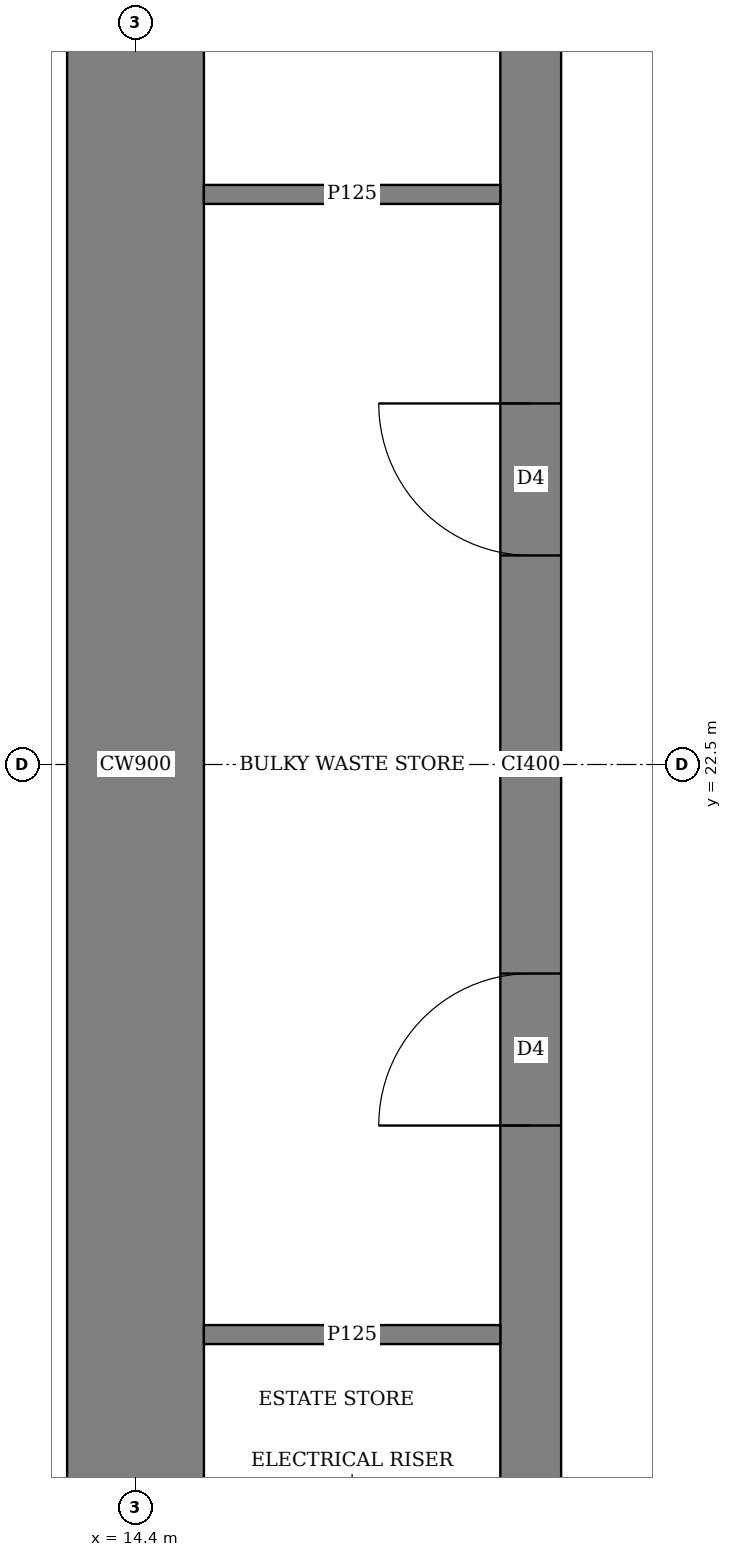
"""IFC4 building model, lengths in metres.
Left out: names, types, materials, properties, quantities, classifications, styles, units other than length and angle.
Written with IfcOpenShell. Run it as: python <this file> out.ifc"""

import sys

from ifc_helpers import new_model, si_unit, direction, frame, frame_2d, origin, place, context, subcontext, project, spatial, rectangle, extrude, element, fill, save


model = new_model("IFC4")
c1 = context("Model", 3, precision=1e-05, world=origin(), true_north=direction((0.0, 1.0)))
c2 = subcontext(c1, "Body", "Model", "MODEL_VIEW")
j1 = project(units=[si_unit("LENGTHUNIT", "METRE"), si_unit("PLANEANGLEUNIT", "RADIAN")], contexts=[c1])
p1 = place(None, origin())
s1 = spatial("IfcSite", under=j1, at=p1, CompositionType="ELEMENT")
p2 = place(p1, origin())
s2 = spatial("IfcBuilding", under=s1, at=p2, CompositionType="ELEMENT")
p3 = place(p2, frame((0.0, 0.0, 227.45)))
s3 = spatial("IfcBuildingStorey", under=s2, at=p3, CompositionType="ELEMENT", Elevation=227.45)
p4 = place(p3, frame((14.4, 15.45, 0.0), z_axis=(0.0, 0.0, 1.0), x_axis=(0.0, 1.0, 0.0)))
e1 = element("IfcWall", 1, at=p4, inside=s3, PredefinedType="SHEAR", context=c2, shape_type="SweptSolid", body=[
    extrude(rectangle(XDim=14.1, YDim=0.9, at=frame_2d((7.05, 0.0))), origin(), (0.0, 0.0, 1.0), 3.75),
])
p5 = place(p3, frame((17.0, 15.45, 0.0), z_axis=(0.0, 0.0, 1.0), x_axis=(0.0, 1.0, 0.0)))
e2 = element("IfcWall", 2, at=p5, inside=s3, PredefinedType="SHEAR", context=c2, shape_type="SweptSolid", body=[
    extrude(rectangle(XDim=14.1, YDim=0.4, at=frame_2d((7.05, 0.0))), origin(), (0.0, 0.0, 1.0), 3.75),
])
p6 = place(p5, frame((1.05, 0.0, 0.0)))
e3 = element("IfcOpeningElement", 3, at=p6, cuts=e2, PredefinedType="OPENING", context=c2, shape_type="SweptSolid", body=[
    extrude(rectangle(XDim=1.0, YDim=2.1, at=frame_2d((0.5, 1.05))), frame((0.0, 0.21, 0.0), z_axis=(0.0, -1.0, 0.0), x_axis=(1.0, 0.0, 0.0)), (0.0, 0.0, 1.0), 0.42),
])
p7 = place(p5, frame((4.675, 0.0, 0.0)))
e4 = element("IfcOpeningElement", 4, at=p7, cuts=e2, PredefinedType="OPENING", context=c2, shape_type="SweptSolid", body=[
    extrude(rectangle(XDim=1.0, YDim=2.1, at=frame_2d((0.5, 1.05))), frame((0.0, 0.21, 0.0), z_axis=(0.0, -1.0, 0.0), x_axis=(1.0, 0.0, 0.0)), (0.0, 0.0, 1.0), 0.42),
])
p8 = place(p5, frame((8.425, 0.0, 0.0)))
e5 = element("IfcOpeningElement", 5, at=p8, cuts=e2, PredefinedType="OPENING", context=c2, shape_type="SweptSolid", body=[
    extrude(rectangle(XDim=1.0, YDim=2.1, at=frame_2d((0.5, 1.05))), frame((0.0, 0.21, 0.0), z_axis=(0.0, -1.0, 0.0), x_axis=(1.0, 0.0, 0.0)), (0.0, 0.0, 1.0), 0.42),
])
p9 = place(p5, frame((12.175, 0.0, 0.0)))
e6 = element("IfcOpeningElement", 6, at=p9, cuts=e2, PredefinedType="OPENING", context=c2, shape_type="SweptSolid", body=[
    extrude(rectangle(XDim=1.0, YDim=2.1, at=frame_2d((0.5, 1.05))), frame((0.0, 0.21, 0.0), z_axis=(0.0, -1.0, 0.0), x_axis=(1.0, 0.0, 0.0)), (0.0, 0.0, 1.0), 0.42),
])
for number, where, z_axis, x_axis in (
    (7, (14.85, 18.75, 0.0), (0.0, 0.0, 1.0), (1.0, 0.0, 0.0)),
    (8, (14.85, 26.25, 0.0), (0.0, 0.0, 1.0), (1.0, 0.0, 0.0)),
):
    element("IfcWall", number, at=place(p3, frame(where, z_axis=z_axis, x_axis=x_axis)), inside=s3, PredefinedType="PARTITIONING", context=c2, shape_type="SweptSolid", body=[
        extrude(rectangle(XDim=1.95, YDim=0.125, at=frame_2d((0.975, 0.0))), origin(), (0.0, 0.0, 1.0), 3.5),
    ])
p10 = place(p7, origin())
e9 = element("IfcDoor", 9, at=p10, inside=s3, OperationType="SINGLE_SWING_LEFT", PredefinedType="DOOR", context=c2, shape_type="SweptSolid", body=[
    extrude(rectangle(XDim=1.0, YDim=2.1, at=frame_2d((0.5, 1.05))), frame((0.0, 0.025, 0.0), z_axis=(0.0, -1.0, 0.0), x_axis=(1.0, 0.0, 0.0)), (0.0, 0.0, 1.0), 0.05),
])
fill(e4, e9)
p11 = place(p8, origin())
e10 = element("IfcDoor", 10, at=p11, inside=s3, OperationType="SINGLE_SWING_RIGHT", PredefinedType="DOOR", context=c2, shape_type="SweptSolid", body=[
    extrude(rectangle(XDim=1.0, YDim=2.1, at=frame_2d((0.5, 1.05))), frame((0.0, 0.025, 0.0), z_axis=(0.0, -1.0, 0.0), x_axis=(1.0, 0.0, 0.0)), (0.0, 0.0, 1.0), 0.05),
])
fill(e5, e10)
save(model, sys.argv[1])
